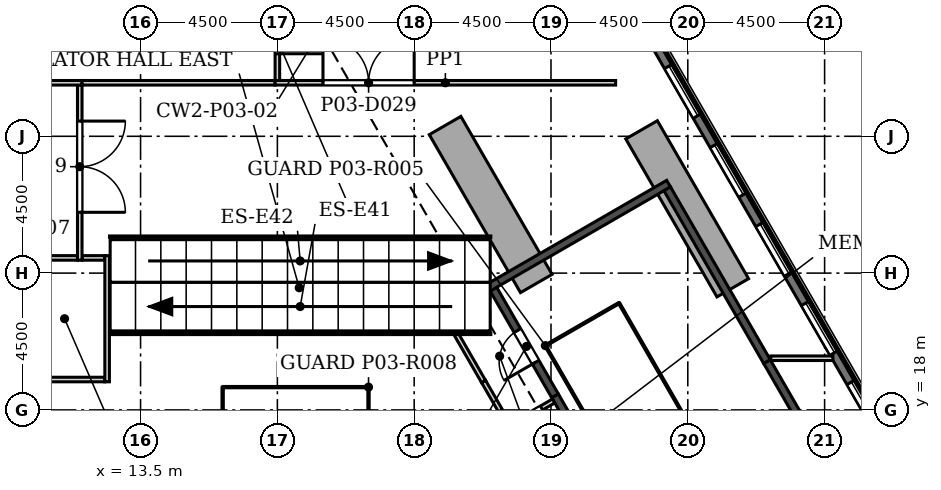
"""IFC4 building model, lengths in metres.
Left out: names, types, materials, properties, quantities, classifications, styles, units other than length and angle.
Written with IfcOpenShell. Run it as: python <this file> out.ifc"""

import sys

from ifc_helpers import new_model, si_unit, direction, frame, frame_2d, origin, place, context, subcontext, project, spatial, polyline, rectangle, outline, extrude, element, fill, save


model = new_model("IFC4")
c1 = context("Model", 3, precision=1e-05, world=origin(), true_north=direction((0.0, 1.0)))
c2 = subcontext(c1, "Body", "Model", "MODEL_VIEW")
j1 = project(units=[si_unit("LENGTHUNIT", "METRE"), si_unit("PLANEANGLEUNIT", "RADIAN")], contexts=[c1])
p1 = place(None, origin())
s1 = spatial("IfcSite", under=j1, at=p1, CompositionType="ELEMENT")
p2 = place(p1, origin())
s2 = spatial("IfcBuilding", under=s1, at=p2, CompositionType="ELEMENT")
p3 = place(p2, frame((0.0, 0.0, 20.0)))
s3 = spatial("IfcBuildingStorey", under=s2, at=p3, CompositionType="ELEMENT", Elevation=20.0)
p4 = place(p3, frame((13.394, 10.703, 0.0), z_axis=(0.0, 0.0, 1.0), x_axis=(-0.50000187635, 0.866024320471, 0.0)))
e1 = element("IfcWall", 1, at=p4, inside=s3, PredefinedType="SHEAR", context=c2, shape_type="SweptSolid", body=[
    extrude(rectangle(XDim=9.177, YDim=1.4, at=frame_2d((4.588, 0.0))), origin(), (0.0, 0.0, 1.0), 5.0),
])
p5 = place(p3, frame((42.853, 8.575, 0.0), z_axis=(0.0, 0.0, 1.0), x_axis=(-0.49999894854, 0.866026010844, 0.0)))
e2 = element("IfcWall", 2, at=p5, inside=s3, PredefinedType="SOLIDWALL", context=c2, shape_type="SweptSolid", body=[
    extrude(rectangle(XDim=76.0, YDim=0.34, at=frame_2d((38.0, 0.0))), origin(), (0.0, 0.0, 1.0), 3.0),
])
p6 = place(p5, frame((1.058, 0.0, 0.9)))
e3 = element("IfcOpeningElement", 3, at=p6, cuts=e2, PredefinedType="OPENING", context=c2, shape_type="SweptSolid", body=[
    extrude(rectangle(XDim=1.885, YDim=1.9, at=frame_2d((0.942, 0.95))), frame((0.0, 0.18, 0.0), z_axis=(0.0, -1.0, 0.0), x_axis=(1.0, 0.0, 0.0)), (0.0, 0.0, 1.0), 0.36),
])
p7 = place(p5, frame((4.058, 0.0, 0.9)))
e4 = element("IfcOpeningElement", 4, at=p7, cuts=e2, PredefinedType="OPENING", context=c2, shape_type="SweptSolid", body=[
    extrude(rectangle(XDim=1.885, YDim=1.9, at=frame_2d((0.942, 0.95))), frame((0.0, 0.18, 0.0), z_axis=(0.0, -1.0, 0.0), x_axis=(1.0, 0.0, 0.0)), (0.0, 0.0, 1.0), 0.36),
])
p8 = place(p5, frame((7.058, 0.0, 0.9)))
e5 = element("IfcOpeningElement", 5, at=p8, cuts=e2, PredefinedType="OPENING", context=c2, shape_type="SweptSolid", body=[
    extrude(rectangle(XDim=1.885, YDim=1.9, at=frame_2d((0.942, 0.95))), frame((0.0, 0.18, 0.0), z_axis=(0.0, -1.0, 0.0), x_axis=(1.0, 0.0, 0.0)), (0.0, 0.0, 1.0), 0.36),
])
p9 = place(p5, frame((10.058, 0.0, 0.9)))
e6 = element("IfcOpeningElement", 6, at=p9, cuts=e2, PredefinedType="OPENING", context=c2, shape_type="SweptSolid", body=[
    extrude(rectangle(XDim=1.885, YDim=1.9, at=frame_2d((0.942, 0.95))), frame((0.0, 0.18, 0.0), z_axis=(0.0, -1.0, 0.0), x_axis=(1.0, 0.0, 0.0)), (0.0, 0.0, 1.0), 0.36),
])
p10 = place(p5, frame((13.058, 0.0, 0.9)))
e7 = element("IfcOpeningElement", 7, at=p10, cuts=e2, PredefinedType="OPENING", context=c2, shape_type="SweptSolid", body=[
    extrude(rectangle(XDim=1.885, YDim=1.9, at=frame_2d((0.942, 0.95))), frame((0.0, 0.18, 0.0), z_axis=(0.0, -1.0, 0.0), x_axis=(1.0, 0.0, 0.0)), (0.0, 0.0, 1.0), 0.36),
])
p11 = place(p5, frame((16.058, 0.0, 0.9)))
e8 = element("IfcOpeningElement", 8, at=p11, cuts=e2, PredefinedType="OPENING", context=c2, shape_type="SweptSolid", body=[
    extrude(rectangle(XDim=1.885, YDim=1.9, at=frame_2d((0.942, 0.95))), frame((0.0, 0.18, 0.0), z_axis=(0.0, -1.0, 0.0), x_axis=(1.0, 0.0, 0.0)), (0.0, 0.0, 1.0), 0.36),
])
p12 = place(p5, frame((19.058, 0.0, 0.9)))
e9 = element("IfcOpeningElement", 9, at=p12, cuts=e2, PredefinedType="OPENING", context=c2, shape_type="SweptSolid", body=[
    extrude(rectangle(XDim=1.885, YDim=1.9, at=frame_2d((0.942, 0.95))), frame((0.0, 0.18, 0.0), z_axis=(0.0, -1.0, 0.0), x_axis=(1.0, 0.0, 0.0)), (0.0, 0.0, 1.0), 0.36),
])
p13 = place(p5, frame((22.058, 0.0, 0.9)))
e10 = element("IfcOpeningElement", 10, at=p13, cuts=e2, PredefinedType="OPENING", context=c2, shape_type="SweptSolid", body=[
    extrude(rectangle(XDim=1.885, YDim=1.9, at=frame_2d((0.942, 0.95))), frame((0.0, 0.18, 0.0), z_axis=(0.0, -1.0, 0.0), x_axis=(1.0, 0.0, 0.0)), (0.0, 0.0, 1.0), 0.36),
])
p14 = place(p5, frame((25.058, 0.0, 0.9)))
e11 = element("IfcOpeningElement", 11, at=p14, cuts=e2, PredefinedType="OPENING", context=c2, shape_type="SweptSolid", body=[
    extrude(rectangle(XDim=1.885, YDim=1.9, at=frame_2d((0.942, 0.95))), frame((0.0, 0.18, 0.0), z_axis=(0.0, -1.0, 0.0), x_axis=(1.0, 0.0, 0.0)), (0.0, 0.0, 1.0), 0.36),
])
p15 = place(p5, frame((28.058, 0.0, 0.9)))
e12 = element("IfcOpeningElement", 12, at=p15, cuts=e2, PredefinedType="OPENING", context=c2, shape_type="SweptSolid", body=[
    extrude(rectangle(XDim=1.885, YDim=1.9, at=frame_2d((0.942, 0.95))), frame((0.0, 0.18, 0.0), z_axis=(0.0, -1.0, 0.0), x_axis=(1.0, 0.0, 0.0)), (0.0, 0.0, 1.0), 0.36),
])
p16 = place(p5, frame((31.058, 0.0, 0.9)))
e13 = element("IfcOpeningElement", 13, at=p16, cuts=e2, PredefinedType="OPENING", context=c2, shape_type="SweptSolid", body=[
    extrude(rectangle(XDim=1.885, YDim=1.9, at=frame_2d((0.942, 0.95))), frame((0.0, 0.18, 0.0), z_axis=(0.0, -1.0, 0.0), x_axis=(1.0, 0.0, 0.0)), (0.0, 0.0, 1.0), 0.36),
])
p17 = place(p5, frame((34.058, 0.0, 0.9)))
e14 = element("IfcOpeningElement", 14, at=p17, cuts=e2, PredefinedType="OPENING", context=c2, shape_type="SweptSolid", body=[
    extrude(rectangle(XDim=1.885, YDim=1.9, at=frame_2d((0.942, 0.95))), frame((0.0, 0.18, 0.0), z_axis=(0.0, -1.0, 0.0), x_axis=(1.0, 0.0, 0.0)), (0.0, 0.0, 1.0), 0.36),
])
p18 = place(p5, frame((37.058, 0.0, 0.9)))
e15 = element("IfcOpeningElement", 15, at=p18, cuts=e2, PredefinedType="OPENING", context=c2, shape_type="SweptSolid", body=[
    extrude(rectangle(XDim=1.885, YDim=1.9, at=frame_2d((0.942, 0.95))), frame((0.0, 0.18, 0.0), z_axis=(0.0, -1.0, 0.0), x_axis=(1.0, 0.0, 0.0)), (0.0, 0.0, 1.0), 0.36),
])
p19 = place(p5, frame((40.058, 0.0, 0.9)))
e16 = element("IfcOpeningElement", 16, at=p19, cuts=e2, PredefinedType="OPENING", context=c2, shape_type="SweptSolid", body=[
    extrude(rectangle(XDim=1.885, YDim=1.9, at=frame_2d((0.942, 0.95))), frame((0.0, 0.18, 0.0), z_axis=(0.0, -1.0, 0.0), x_axis=(1.0, 0.0, 0.0)), (0.0, 0.0, 1.0), 0.36),
])
p20 = place(p5, frame((43.058, 0.0, 0.9)))
e17 = element("IfcOpeningElement", 17, at=p20, cuts=e2, PredefinedType="OPENING", context=c2, shape_type="SweptSolid", body=[
    extrude(rectangle(XDim=1.885, YDim=1.9, at=frame_2d((0.942, 0.95))), frame((0.0, 0.18, 0.0), z_axis=(0.0, -1.0, 0.0), x_axis=(1.0, 0.0, 0.0)), (0.0, 0.0, 1.0), 0.36),
])
p21 = place(p5, frame((46.058, 0.0, 0.9)))
e18 = element("IfcOpeningElement", 18, at=p21, cuts=e2, PredefinedType="OPENING", context=c2, shape_type="SweptSolid", body=[
    extrude(rectangle(XDim=1.885, YDim=1.9, at=frame_2d((0.942, 0.95))), frame((0.0, 0.18, 0.0), z_axis=(0.0, -1.0, 0.0), x_axis=(1.0, 0.0, 0.0)), (0.0, 0.0, 1.0), 0.36),
])
p22 = place(p5, frame((49.058, 0.0, 0.9)))
e19 = element("IfcOpeningElement", 19, at=p22, cuts=e2, PredefinedType="OPENING", context=c2, shape_type="SweptSolid", body=[
    extrude(rectangle(XDim=1.885, YDim=1.9, at=frame_2d((0.942, 0.95))), frame((0.0, 0.18, 0.0), z_axis=(0.0, -1.0, 0.0), x_axis=(1.0, 0.0, 0.0)), (0.0, 0.0, 1.0), 0.36),
])
p23 = place(p5, frame((52.058, 0.0, 0.9)))
e20 = element("IfcOpeningElement", 20, at=p23, cuts=e2, PredefinedType="OPENING", context=c2, shape_type="SweptSolid", body=[
    extrude(rectangle(XDim=1.885, YDim=1.9, at=frame_2d((0.942, 0.95))), frame((0.0, 0.18, 0.0), z_axis=(0.0, -1.0, 0.0), x_axis=(1.0, 0.0, 0.0)), (0.0, 0.0, 1.0), 0.36),
])
p24 = place(p5, frame((55.058, 0.0, 0.9)))
e21 = element("IfcOpeningElement", 21, at=p24, cuts=e2, PredefinedType="OPENING", context=c2, shape_type="SweptSolid", body=[
    extrude(rectangle(XDim=1.885, YDim=1.9, at=frame_2d((0.942, 0.95))), frame((0.0, 0.18, 0.0), z_axis=(0.0, -1.0, 0.0), x_axis=(1.0, 0.0, 0.0)), (0.0, 0.0, 1.0), 0.36),
])
p25 = place(p5, frame((58.058, 0.0, 0.9)))
e22 = element("IfcOpeningElement", 22, at=p25, cuts=e2, PredefinedType="OPENING", context=c2, shape_type="SweptSolid", body=[
    extrude(rectangle(XDim=1.885, YDim=1.9, at=frame_2d((0.942, 0.95))), frame((0.0, 0.18, 0.0), z_axis=(0.0, -1.0, 0.0), x_axis=(1.0, 0.0, 0.0)), (0.0, 0.0, 1.0), 0.36),
])
p26 = place(p5, frame((61.058, 0.0, 0.9)))
e23 = element("IfcOpeningElement", 23, at=p26, cuts=e2, PredefinedType="OPENING", context=c2, shape_type="SweptSolid", body=[
    extrude(rectangle(XDim=1.885, YDim=1.9, at=frame_2d((0.942, 0.95))), frame((0.0, 0.18, 0.0), z_axis=(0.0, -1.0, 0.0), x_axis=(1.0, 0.0, 0.0)), (0.0, 0.0, 1.0), 0.36),
])
p27 = place(p5, frame((64.058, 0.0, 0.9)))
e24 = element("IfcOpeningElement", 24, at=p27, cuts=e2, PredefinedType="OPENING", context=c2, shape_type="SweptSolid", body=[
    extrude(rectangle(XDim=1.885, YDim=1.9, at=frame_2d((0.942, 0.95))), frame((0.0, 0.18, 0.0), z_axis=(0.0, -1.0, 0.0), x_axis=(1.0, 0.0, 0.0)), (0.0, 0.0, 1.0), 0.36),
])
p28 = place(p5, frame((67.058, 0.0, 0.9)))
e25 = element("IfcOpeningElement", 25, at=p28, cuts=e2, PredefinedType="OPENING", context=c2, shape_type="SweptSolid", body=[
    extrude(rectangle(XDim=1.885, YDim=1.9, at=frame_2d((0.942, 0.95))), frame((0.0, 0.18, 0.0), z_axis=(0.0, -1.0, 0.0), x_axis=(1.0, 0.0, 0.0)), (0.0, 0.0, 1.0), 0.36),
])
p29 = place(p5, frame((70.058, 0.0, 0.9)))
e26 = element("IfcOpeningElement", 26, at=p29, cuts=e2, PredefinedType="OPENING", context=c2, shape_type="SweptSolid", body=[
    extrude(rectangle(XDim=1.885, YDim=1.9, at=frame_2d((0.942, 0.95))), frame((0.0, 0.18, 0.0), z_axis=(0.0, -1.0, 0.0), x_axis=(1.0, 0.0, 0.0)), (0.0, 0.0, 1.0), 0.36),
])
p30 = place(p5, frame((73.058, 0.0, 0.9)))
e27 = element("IfcOpeningElement", 27, at=p30, cuts=e2, PredefinedType="OPENING", context=c2, shape_type="SweptSolid", body=[
    extrude(rectangle(XDim=1.885, YDim=1.9, at=frame_2d((0.942, 0.95))), frame((0.0, 0.18, 0.0), z_axis=(0.0, -1.0, 0.0), x_axis=(1.0, 0.0, 0.0)), (0.0, 0.0, 1.0), 0.36),
])
p31 = place(p3, frame((0.0, 0.0, 5.0)))
e28 = element("IfcWall", 28, at=p31, inside=s3, PredefinedType="USERDEFINED", context=c2, shape_type="SweptSolid", body=[
    extrude(outline(polyline([(30.499, 27.513), (29.46, 26.913), (32.46, 21.717), (33.499, 22.317), (30.499, 27.513)])), origin(), (0.0, 0.0, 1.0), 1.1),
])
p32 = place(p3, frame((0.0, 0.0, 5.0)))
e29 = element("IfcWall", 29, at=p32, inside=s3, PredefinedType="USERDEFINED", context=c2, shape_type="SweptSolid", body=[
    extrude(outline(polyline([(25.997, 21.858), (27.036, 22.458), (24.036, 27.654), (22.997, 27.054), (25.997, 21.858)])), origin(), (0.0, 0.0, 1.0), 1.1),
])
p33 = place(p3, frame((30.907, 11.927, 0.0), z_axis=(0.0, 0.0, 1.0), x_axis=(-0.499985572004, 0.866033733632, 0.0)))
e30 = element("IfcWall", 30, at=p33, inside=s3, PredefinedType="SOLIDWALL", context=c2, shape_type="SweptSolid", body=[
    extrude(rectangle(XDim=7.55, YDim=0.25, at=frame_2d((3.775, 0.0))), origin(), (0.0, 0.0, 1.0), 3.0),
])
p34 = place(p3, frame((25.337, 17.975, 0.0), z_axis=(0.0, 0.0, 1.0), x_axis=(-0.50011622646, 0.865958290007, 0.0)))
e31 = element("IfcWall", 31, at=p34, inside=s3, PredefinedType="PARTITIONING", context=c2, shape_type="SweptSolid", body=[
    extrude(rectangle(XDim=1.109, YDim=0.15, at=frame_2d((0.555, 0.0))), origin(), (0.0, 0.0, 1.0), 3.0),
])
p35 = place(p3, frame((27.087, 18.294, 0.0), z_axis=(0.0, 0.0, 1.0), x_axis=(-0.866100518934, -0.499869874169, 0.0)))
e32 = element("IfcWall", 32, at=p35, inside=s3, PredefinedType="PARTITIONING", context=c2, shape_type="SweptSolid", body=[
    extrude(rectangle(XDim=1.816, YDim=0.15, at=frame_2d((0.908, 0.0))), origin(), (0.0, 0.0, 1.0), 3.0),
])
p36 = place(p35, frame((0.461, 0.0, 0.0)))
e33 = element("IfcOpeningElement", 33, at=p36, cuts=e32, PredefinedType="OPENING", context=c2, shape_type="SweptSolid", body=[
    extrude(rectangle(XDim=1.1, YDim=2.1, at=frame_2d((0.55, 1.05))), frame((0.0, 0.085, 0.0), z_axis=(0.0, -1.0, 0.0), x_axis=(1.0, 0.0, 0.0)), (0.0, 0.0, 1.0), 0.17),
])
p37 = place(p3, frame((27.132, 18.465, 0.0), z_axis=(0.0, 0.0, 1.0), x_axis=(-0.499971214291, 0.866042022584, 0.0)))
e34 = element("IfcWall", 34, at=p37, inside=s3, PredefinedType="SOLIDWALL", context=c2, shape_type="SweptSolid", body=[
    extrude(rectangle(XDim=4.05, YDim=0.25, at=frame_2d((2.025, 0.0))), origin(), (0.0, 0.0, 1.0), 3.0),
])
p38 = place(p37, frame((1.275, 0.0, 0.0)))
e35 = element("IfcOpeningElement", 35, at=p38, cuts=e34, PredefinedType="OPENING", context=c2, shape_type="SweptSolid", body=[
    extrude(rectangle(XDim=1.2, YDim=2.1, at=frame_2d((0.6, 1.05))), frame((0.0, 0.135, 0.0), z_axis=(0.0, -1.0, 0.0), x_axis=(1.0, 0.0, 0.0)), (0.0, 0.0, 1.0), 0.27),
])
p39 = place(p3, frame((24.782, 18.935, 0.0), z_axis=(0.0, 0.0, 1.0), x_axis=(-0.499962016178, 0.866047332643, 0.0)))
e36 = element("IfcWall", 36, at=p39, inside=s3, PredefinedType="PARTITIONING", context=c2, shape_type="SweptSolid", body=[
    extrude(rectangle(XDim=1.882, YDim=0.15, at=frame_2d((0.941, 0.0))), origin(), (0.0, 0.0, 1.0), 3.0),
])
p40 = place(p3, frame((12.325, 19.0, 0.0), z_axis=(0.0, 0.0, 1.0), x_axis=(-1.0, 0.0, 0.0)))
e37 = element("IfcWall", 37, at=p40, inside=s3, PredefinedType="PARTITIONING", context=c2, shape_type="SweptSolid", body=[
    extrude(rectangle(XDim=2.65, YDim=0.15, at=frame_2d((1.325, 0.0))), origin(), (0.0, 0.0, 1.0), 3.0),
])
p41 = place(p3, frame((34.103, 19.592, 0.0), z_axis=(0.0, 0.0, 1.0), x_axis=(0.499981253467, -0.86603622683, 0.0)))
e38 = element("IfcWall", 38, at=p41, inside=s3, PredefinedType="SOLIDWALL", context=c2, shape_type="SweptSolid", body=[
    extrude(rectangle(XDim=4.791, YDim=0.25, at=frame_2d((2.396, 0.0))), origin(), (0.0, 0.0, 1.0), 3.0),
])
p42 = place(p3, frame((34.229, 19.7, 0.0), z_axis=(0.0, 0.0, 1.0), x_axis=(1.0, 0.0, 0.0)))
e39 = element("IfcWall", 39, at=p42, inside=s3, PredefinedType="PARTITIONING", context=c2, shape_type="SweptSolid", body=[
    extrude(rectangle(XDim=2.044, YDim=0.15, at=frame_2d((1.022, 0.0))), origin(), (0.0, 0.0, 1.0), 3.0),
])
p43 = place(p3, frame((24.936, 22.018, 0.0), z_axis=(0.0, 0.0, 1.0), x_axis=(0.866050272892, 0.499956922968, 0.0)))
e40 = element("IfcWall", 40, at=p43, inside=s3, PredefinedType="SOLIDWALL", context=c2, shape_type="SweptSolid", body=[
    extrude(rectangle(XDim=6.85, YDim=0.25, at=frame_2d((3.425, 0.0))), origin(), (0.0, 0.0, 1.0), 3.0),
])
p44 = place(p3, frame((9.675, 23.0, 0.0), z_axis=(0.0, 0.0, 1.0), x_axis=(1.0, 0.0, 0.0)))
e41 = element("IfcWall", 41, at=p44, inside=s3, PredefinedType="PARTITIONING", context=c2, shape_type="SweptSolid", body=[
    extrude(rectangle(XDim=1.75, YDim=0.15, at=frame_2d((0.875, 0.0))), origin(), (0.0, 0.0, 1.0), 3.0),
])
p45 = place(p3, frame((11.575, 23.0, 0.0), z_axis=(0.0, 0.0, 1.0), x_axis=(1.0, 0.0, 0.0)))
e42 = element("IfcWall", 42, at=p45, inside=s3, PredefinedType="PARTITIONING", context=c2, shape_type="SweptSolid", body=[
    extrude(rectangle(XDim=0.75, YDim=0.15, at=frame_2d((0.375, 0.0))), origin(), (0.0, 0.0, 1.0), 3.0),
])
p46 = place(p3, frame((12.4, 23.075, 0.0), z_axis=(0.0, 0.0, 1.0), x_axis=(0.0, -1.0, 0.0)))
e43 = element("IfcWall", 43, at=p46, inside=s3, PredefinedType="PARTITIONING", context=c2, shape_type="SweptSolid", body=[
    extrude(rectangle(XDim=4.15, YDim=0.15, at=frame_2d((2.075, 0.0))), origin(), (0.0, 0.0, 1.0), 3.0),
])
p47 = place(p3, frame((30.823, 25.272, 0.0), z_axis=(0.0, 0.0, 1.0), x_axis=(0.499978056798, -0.866038072327, 0.0)))
e44 = element("IfcWall", 44, at=p47, inside=s3, PredefinedType="SOLIDWALL", context=c2, shape_type="SweptSolid", body=[
    extrude(rectangle(XDim=6.559, YDim=0.25, at=frame_2d((3.28, 0.0))), origin(), (0.0, 0.0, 1.0), 3.0),
])
p48 = place(p3, frame((11.5, 28.685, 0.0), z_axis=(0.0, 0.0, 1.0), x_axis=(0.0, -1.0, 0.0)))
e45 = element("IfcWall", 45, at=p48, inside=s3, PredefinedType="PARTITIONING", context=c2, shape_type="SweptSolid", body=[
    extrude(rectangle(XDim=5.76, YDim=0.15, at=frame_2d((2.88, 0.0))), origin(), (0.0, 0.0, 1.0), 3.0),
])
p49 = place(p48, frame((1.185, 0.0, 0.0)))
e46 = element("IfcOpeningElement", 46, at=p49, cuts=e45, PredefinedType="OPENING", context=c2, shape_type="SweptSolid", body=[
    extrude(rectangle(XDim=3.0, YDim=2.4, at=frame_2d((1.5, 1.2))), frame((0.0, 0.085, 0.0), z_axis=(0.0, -1.0, 0.0), x_axis=(1.0, 0.0, 0.0)), (0.0, 0.0, 1.0), 0.17),
])
p50 = place(p3, frame((4.105, 28.76, 0.0), z_axis=(0.0, 0.0, 1.0), x_axis=(1.0, 0.0, 0.0)))
e47 = element("IfcWall", 47, at=p50, inside=s3, PredefinedType="PARTITIONING", context=c2, shape_type="SweptSolid", body=[
    extrude(rectangle(XDim=7.47, YDim=0.15, at=frame_2d((3.735, 0.0))), origin(), (0.0, 0.0, 1.0), 3.0),
])
p51 = place(p50, frame((0.395, 0.0, 0.0)))
e48 = element("IfcOpeningElement", 48, at=p51, cuts=e47, PredefinedType="OPENING", context=c2, shape_type="SweptSolid", body=[
    extrude(rectangle(XDim=3.0, YDim=2.4, at=frame_2d((1.5, 1.2))), frame((0.0, 0.085, 0.0), z_axis=(0.0, -1.0, 0.0), x_axis=(1.0, 0.0, 0.0)), (0.0, 0.0, 1.0), 0.17),
])
p52 = place(p3, frame((11.575, 28.76, 0.0), z_axis=(0.0, 0.0, 1.0), x_axis=(1.0, 0.0, 0.0)))
e49 = element("IfcWall", 49, at=p52, inside=s3, PredefinedType="PARTITIONING", context=c2, shape_type="SweptSolid", body=[
    extrude(rectangle(XDim=6.35, YDim=0.15, at=frame_2d((3.175, 0.0))), origin(), (0.0, 0.0, 1.0), 3.0),
])
p53 = place(p3, frame((17.925, 28.76, 0.0), z_axis=(0.0, 0.0, 1.0), x_axis=(1.0, 0.0, 0.0)))
e50 = element("IfcWall", 50, at=p53, inside=s3, PredefinedType="PARTITIONING", context=c2, shape_type="SweptSolid", body=[
    extrude(rectangle(XDim=11.201, YDim=0.15, at=frame_2d((5.601, 0.0))), origin(), (0.0, 0.0, 1.0), 3.0),
])
p54 = place(p53, frame((1.575, 0.0, 0.0)))
e51 = element("IfcOpeningElement", 51, at=p54, cuts=e50, PredefinedType="OPENING", context=c2, shape_type="SweptSolid", body=[
    extrude(rectangle(XDim=3.0, YDim=2.4, at=frame_2d((1.5, 1.2))), frame((0.0, 0.085, 0.0), z_axis=(0.0, -1.0, 0.0), x_axis=(1.0, 0.0, 0.0)), (0.0, 0.0, 1.0), 0.17),
])
p55 = place(p3, frame((18.0, 28.835, 0.0), z_axis=(0.0, 0.0, 1.0), x_axis=(0.0, 1.0, 0.0)))
e52 = element("IfcWall", 52, at=p55, inside=s3, PredefinedType="PARTITIONING", context=c2, shape_type="SweptSolid", body=[
    extrude(rectangle(XDim=4.0, YDim=0.15, at=frame_2d((2.0, 0.0))), origin(), (0.0, 0.0, 1.0), 3.0),
])
p56 = place(p55, frame((0.88, 0.0, 0.0)))
e53 = element("IfcOpeningElement", 53, at=p56, cuts=e52, PredefinedType="OPENING", context=c2, shape_type="SweptSolid", body=[
    extrude(rectangle(XDim=3.0, YDim=2.4, at=frame_2d((1.5, 1.2))), frame((0.0, 0.085, 0.0), z_axis=(0.0, -1.0, 0.0), x_axis=(1.0, 0.0, 0.0)), (0.0, 0.0, 1.0), 0.17),
])
p57 = place(p9, origin())
e54 = element("IfcWindow", 54, at=p57, inside=s3, PartitioningType="SINGLE_PANEL", PredefinedType="WINDOW", context=c2, shape_type="SweptSolid", body=[
    extrude(rectangle(XDim=1.885, YDim=1.9, at=frame_2d((0.942, 0.95))), frame((0.0, 0.11, 0.0), z_axis=(0.0, -1.0, 0.0), x_axis=(1.0, 0.0, 0.0)), (0.0, 0.0, 1.0), 0.06),
])
fill(e6, e54)
p58 = place(p10, origin())
e55 = element("IfcWindow", 55, at=p58, inside=s3, PartitioningType="SINGLE_PANEL", PredefinedType="WINDOW", context=c2, shape_type="SweptSolid", body=[
    extrude(rectangle(XDim=1.885, YDim=1.9, at=frame_2d((0.942, 0.95))), frame((0.0, 0.11, 0.0), z_axis=(0.0, -1.0, 0.0), x_axis=(1.0, 0.0, 0.0)), (0.0, 0.0, 1.0), 0.06),
])
fill(e7, e55)
p59 = place(p11, origin())
e56 = element("IfcWindow", 56, at=p59, inside=s3, PartitioningType="SINGLE_PANEL", PredefinedType="WINDOW", context=c2, shape_type="SweptSolid", body=[
    extrude(rectangle(XDim=1.885, YDim=1.9, at=frame_2d((0.942, 0.95))), frame((0.0, 0.11, 0.0), z_axis=(0.0, -1.0, 0.0), x_axis=(1.0, 0.0, 0.0)), (0.0, 0.0, 1.0), 0.06),
])
fill(e8, e56)
p60 = place(p12, origin())
e57 = element("IfcWindow", 57, at=p60, inside=s3, PartitioningType="SINGLE_PANEL", PredefinedType="WINDOW", context=c2, shape_type="SweptSolid", body=[
    extrude(rectangle(XDim=1.885, YDim=1.9, at=frame_2d((0.942, 0.95))), frame((0.0, 0.11, 0.0), z_axis=(0.0, -1.0, 0.0), x_axis=(1.0, 0.0, 0.0)), (0.0, 0.0, 1.0), 0.06),
])
fill(e9, e57)
p61 = place(p13, origin())
e58 = element("IfcWindow", 58, at=p61, inside=s3, PartitioningType="SINGLE_PANEL", PredefinedType="WINDOW", context=c2, shape_type="SweptSolid", body=[
    extrude(rectangle(XDim=1.885, YDim=1.9, at=frame_2d((0.942, 0.95))), frame((0.0, 0.11, 0.0), z_axis=(0.0, -1.0, 0.0), x_axis=(1.0, 0.0, 0.0)), (0.0, 0.0, 1.0), 0.06),
])
fill(e10, e58)
p62 = place(p38, origin())
e59 = element("IfcDoor", 59, at=p62, inside=s3, OperationType="SINGLE_SWING_LEFT", PredefinedType="DOOR", context=c2, shape_type="SweptSolid", body=[
    extrude(rectangle(XDim=1.2, YDim=2.1, at=frame_2d((0.6, 1.05))), frame((0.0, 0.025, 0.0), z_axis=(0.0, -1.0, 0.0), x_axis=(1.0, 0.0, 0.0)), (0.0, 0.0, 1.0), 0.05),
])
fill(e35, e59)
p63 = place(p36, origin())
e60 = element("IfcDoor", 60, at=p63, inside=s3, OperationType="SINGLE_SWING_RIGHT", PredefinedType="DOOR", context=c2, shape_type="SweptSolid", body=[
    extrude(rectangle(XDim=1.1, YDim=2.1, at=frame_2d((0.55, 1.05))), frame((0.0, 0.025, 0.0), z_axis=(0.0, -1.0, 0.0), x_axis=(1.0, 0.0, 0.0)), (0.0, 0.0, 1.0), 0.05),
])
fill(e33, e60)
p64 = place(p49, origin())
e61 = element("IfcDoor", 61, at=p64, inside=s3, OperationType="DOUBLE_DOOR_SINGLE_SWING", PredefinedType="DOOR", context=c2, shape_type="SweptSolid", body=[
    extrude(rectangle(XDim=3.0, YDim=2.4, at=frame_2d((1.5, 1.2))), frame((0.0, 0.025, 0.0), z_axis=(0.0, -1.0, 0.0), x_axis=(1.0, 0.0, 0.0)), (0.0, 0.0, 1.0), 0.05),
])
fill(e46, e61)
p65 = place(p56, frame((3.0, 0.0, 0.0), z_axis=(0.0, 0.0, 1.0), x_axis=(-1.0, 0.0, 0.0)))
e62 = element("IfcDoor", 62, at=p65, inside=s3, OperationType="DOUBLE_DOOR_SINGLE_SWING", PredefinedType="DOOR", context=c2, shape_type="SweptSolid", body=[
    extrude(rectangle(XDim=3.0, YDim=2.4, at=frame_2d((1.5, 1.2))), frame((0.0, 0.025, 0.0), z_axis=(0.0, -1.0, 0.0), x_axis=(1.0, 0.0, 0.0)), (0.0, 0.0, 1.0), 0.05),
])
fill(e53, e62)
p66 = place(p54, origin())
e63 = element("IfcDoor", 63, at=p66, inside=s3, OperationType="DOUBLE_DOOR_SINGLE_SWING", PredefinedType="DOOR", context=c2, shape_type="SweptSolid", body=[
    extrude(rectangle(XDim=3.0, YDim=2.4, at=frame_2d((1.5, 1.2))), frame((0.0, 0.025, 0.0), z_axis=(0.0, -1.0, 0.0), x_axis=(1.0, 0.0, 0.0)), (0.0, 0.0, 1.0), 0.05),
])
fill(e51, e63)
save(model, sys.argv[1])
